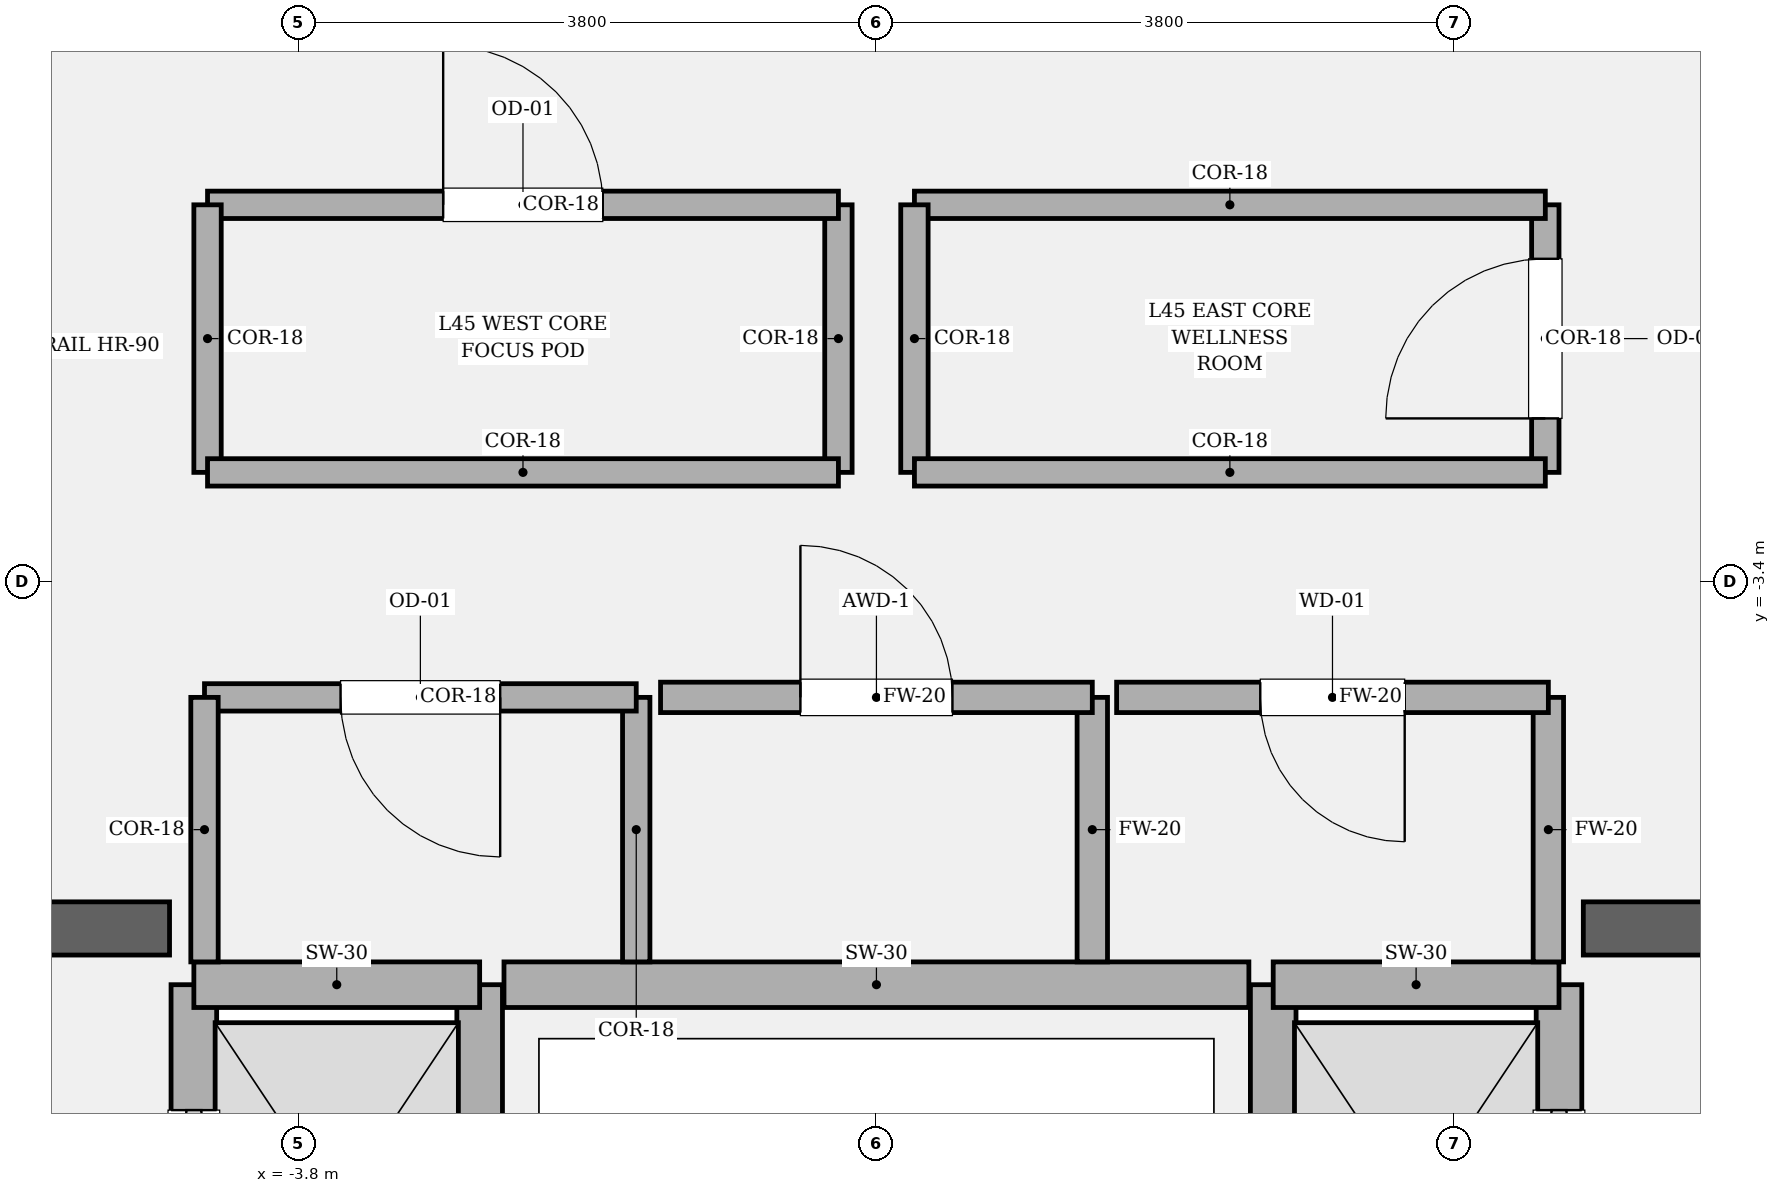
"""IFC4 building model, lengths in metres.
Left out: names, types, materials, properties, quantities, classifications, styles, units other than length and angle.
Written with IfcOpenShell. Run it as: python <this file> out.ifc"""

import sys

from ifc_helpers import new_model, si_unit, direction, frame, frame_2d, origin, place, context, subcontext, project, spatial, rectangle, extrude, element, fill, save


model = new_model("IFC4")
c1 = context("Model", 3, precision=1e-05, world=origin(), true_north=direction((0.0, 1.0)))
c2 = subcontext(c1, "Body", "Model", "MODEL_VIEW")
j1 = project(units=[si_unit("LENGTHUNIT", "METRE"), si_unit("PLANEANGLEUNIT", "RADIAN")], contexts=[c1])
p1 = place(None, origin())
s1 = spatial("IfcSite", under=j1, at=p1, CompositionType="ELEMENT")
p2 = place(p1, origin())
s2 = spatial("IfcBuilding", under=s1, at=p2, CompositionType="ELEMENT")
p3 = place(p2, frame((0.0, 0.0, 192.45)))
s3 = spatial("IfcBuildingStorey", under=s2, at=p3, CompositionType="ELEMENT", Elevation=192.45)
p4 = place(p3, frame((-9.875, -5.68, 0.0), z_axis=(0.0, 0.0, 1.0), x_axis=(1.0, 0.0, 0.0)))
e1 = element("IfcWall", 1, at=p4, inside=s3, PredefinedType="SOLIDWALL", context=c2, shape_type="SweptSolid", body=[
    extrude(rectangle(XDim=5.225, YDim=0.35, at=frame_2d((2.613, 0.0))), origin(), (0.0, 0.0, 1.0), 4.05),
])
p5 = place(p4, frame((1.335, 0.0, 0.0)))
e2 = element("IfcOpeningElement", 2, at=p5, cuts=e1, PredefinedType="OPENING", context=c2, shape_type="SweptSolid", body=[
    extrude(rectangle(XDim=1.18, YDim=2.2, at=frame_2d((0.59, 1.1))), frame((0.0, 0.185, 0.0), z_axis=(0.0, -1.0, 0.0), x_axis=(1.0, 0.0, 0.0)), (0.0, 0.0, 1.0), 0.37),
])
p6 = place(p3, frame((4.65, -5.68, 0.0), z_axis=(0.0, 0.0, 1.0), x_axis=(1.0, 0.0, 0.0)))
e3 = element("IfcWall", 3, at=p6, inside=s3, PredefinedType="SOLIDWALL", context=c2, shape_type="SweptSolid", body=[
    extrude(rectangle(XDim=5.225, YDim=0.35, at=frame_2d((2.613, 0.0))), origin(), (0.0, 0.0, 1.0), 4.05),
])
p7 = place(p6, frame((2.71, 0.0, 0.0)))
e4 = element("IfcOpeningElement", 4, at=p7, cuts=e3, PredefinedType="OPENING", context=c2, shape_type="SweptSolid", body=[
    extrude(rectangle(XDim=1.18, YDim=2.2, at=frame_2d((0.59, 1.1))), frame((0.0, 0.185, 0.0), z_axis=(0.0, -1.0, 0.0), x_axis=(1.0, 0.0, 0.0)), (0.0, 0.0, 1.0), 0.37),
])
p8 = place(p3, frame((-4.49, -8.82, 0.0), z_axis=(0.0, 0.0, 1.0), x_axis=(0.0, 1.0, 0.0)))
e5 = element("IfcWall", 5, at=p8, inside=s3, PredefinedType="SOLIDWALL", context=c2, shape_type="SweptSolid", body=[
    extrude(rectangle(XDim=2.77, YDim=0.3, at=frame_2d((1.385, 0.0))), origin(), (0.0, 0.0, 1.0), 3.83),
])
p9 = place(p8, frame((0.825, 0.0, 0.0)))
e6 = element("IfcOpeningElement", 6, at=p9, cuts=e5, PredefinedType="OPENING", context=c2, shape_type="SweptSolid", body=[
    extrude(rectangle(XDim=1.12, YDim=2.25, at=frame_2d((0.56, 1.125))), frame((0.0, 0.16, 0.0), z_axis=(0.0, -1.0, 0.0), x_axis=(1.0, 0.0, 0.0)), (0.0, 0.0, 1.0), 0.32),
])
p10 = place(p3, frame((-2.61, -8.82, 0.0), z_axis=(0.0, 0.0, 1.0), x_axis=(0.0, 1.0, 0.0)))
e7 = element("IfcWall", 7, at=p10, inside=s3, PredefinedType="SOLIDWALL", context=c2, shape_type="SweptSolid", body=[
    extrude(rectangle(XDim=2.77, YDim=0.3, at=frame_2d((1.385, 0.0))), origin(), (0.0, 0.0, 1.0), 3.83),
])
p11 = place(p3, frame((-4.49, -6.05, 0.0), z_axis=(0.0, 0.0, 1.0), x_axis=(1.0, 0.0, 0.0)))
e8 = element("IfcWall", 8, at=p11, inside=s3, PredefinedType="SOLIDWALL", context=c2, shape_type="SweptSolid", body=[
    extrude(rectangle(XDim=1.88, YDim=0.3, at=frame_2d((0.94, 0.0))), origin(), (0.0, 0.0, 1.0), 3.83),
])
p12 = place(p3, frame((4.49, -8.82, 0.0), z_axis=(0.0, 0.0, 1.0), x_axis=(0.0, 1.0, 0.0)))
e9 = element("IfcWall", 9, at=p12, inside=s3, PredefinedType="SOLIDWALL", context=c2, shape_type="SweptSolid", body=[
    extrude(rectangle(XDim=2.77, YDim=0.3, at=frame_2d((1.385, 0.0))), origin(), (0.0, 0.0, 1.0), 3.83),
])
p13 = place(p12, frame((0.825, 0.0, 0.0)))
e10 = element("IfcOpeningElement", 10, at=p13, cuts=e9, PredefinedType="OPENING", context=c2, shape_type="SweptSolid", body=[
    extrude(rectangle(XDim=1.12, YDim=2.25, at=frame_2d((0.56, 1.125))), frame((0.0, 0.16, 0.0), z_axis=(0.0, -1.0, 0.0), x_axis=(1.0, 0.0, 0.0)), (0.0, 0.0, 1.0), 0.32),
])
p14 = place(p3, frame((2.61, -8.82, 0.0), z_axis=(0.0, 0.0, 1.0), x_axis=(0.0, 1.0, 0.0)))
e11 = element("IfcWall", 11, at=p14, inside=s3, PredefinedType="SOLIDWALL", context=c2, shape_type="SweptSolid", body=[
    extrude(rectangle(XDim=2.77, YDim=0.3, at=frame_2d((1.385, 0.0))), origin(), (0.0, 0.0, 1.0), 3.83),
])
p15 = place(p3, frame((2.61, -6.05, 0.0), z_axis=(0.0, 0.0, 1.0), x_axis=(1.0, 0.0, 0.0)))
e12 = element("IfcWall", 12, at=p15, inside=s3, PredefinedType="SOLIDWALL", context=c2, shape_type="SweptSolid", body=[
    extrude(rectangle(XDim=1.88, YDim=0.3, at=frame_2d((0.94, 0.0))), origin(), (0.0, 0.0, 1.0), 3.83),
])
p16 = place(p3, frame((-2.45, -6.05, 0.0), z_axis=(0.0, 0.0, 1.0), x_axis=(1.0, 0.0, 0.0)))
e13 = element("IfcWall", 13, at=p16, inside=s3, PredefinedType="SOLIDWALL", context=c2, shape_type="SweptSolid", body=[
    extrude(rectangle(XDim=4.9, YDim=0.3, at=frame_2d((2.45, 0.0))), origin(), (0.0, 0.0, 1.0), 3.83),
])
p17 = place(p3, frame((-1.58, -5.9, 0.0), z_axis=(0.0, 0.0, 1.0), x_axis=(0.0, 1.0, 0.0)))
e14 = element("IfcWall", 14, at=p17, inside=s3, PredefinedType="PARTITIONING", context=c2, shape_type="SweptSolid", body=[
    extrude(rectangle(XDim=1.74, YDim=0.18, at=frame_2d((0.87, 0.0))), origin(), (0.0, 0.0, 1.0), 3.83),
])
p18 = place(p3, frame((-1.58, -4.16, 0.0), z_axis=(0.0, 0.0, 1.0), x_axis=(-1.0, 0.0, 0.0)))
e15 = element("IfcWall", 15, at=p18, inside=s3, PredefinedType="PARTITIONING", context=c2, shape_type="SweptSolid", body=[
    extrude(rectangle(XDim=2.84, YDim=0.18, at=frame_2d((1.42, 0.0))), origin(), (0.0, 0.0, 1.0), 3.83),
])
p19 = place(p18, frame((0.895, 0.0, 0.0)))
e16 = element("IfcOpeningElement", 16, at=p19, cuts=e15, PredefinedType="OPENING", context=c2, shape_type="SweptSolid", body=[
    extrude(rectangle(XDim=1.05, YDim=2.2, at=frame_2d((0.525, 1.1))), frame((0.0, 0.1, 0.0), z_axis=(0.0, -1.0, 0.0), x_axis=(1.0, 0.0, 0.0)), (0.0, 0.0, 1.0), 0.2),
])
p20 = place(p3, frame((-4.42, -4.16, 0.0), z_axis=(0.0, 0.0, 1.0), x_axis=(0.0, -1.0, 0.0)))
e17 = element("IfcWall", 17, at=p20, inside=s3, PredefinedType="PARTITIONING", context=c2, shape_type="SweptSolid", body=[
    extrude(rectangle(XDim=1.74, YDim=0.18, at=frame_2d((0.87, 0.0))), origin(), (0.0, 0.0, 1.0), 3.83),
])
p21 = place(p3, frame((1.42, -5.9, 0.0), z_axis=(0.0, 0.0, 1.0), x_axis=(0.0, 1.0, 0.0)))
e18 = element("IfcWall", 18, at=p21, inside=s3, PredefinedType="SOLIDWALL", context=c2, shape_type="SweptSolid", body=[
    extrude(rectangle(XDim=1.74, YDim=0.2, at=frame_2d((0.87, 0.0))), origin(), (0.0, 0.0, 1.0), 3.83),
])
p22 = place(p3, frame((1.42, -4.16, 0.0), z_axis=(0.0, 0.0, 1.0), x_axis=(-1.0, 0.0, 0.0)))
e19 = element("IfcWall", 19, at=p22, inside=s3, PredefinedType="SOLIDWALL", context=c2, shape_type="SweptSolid", body=[
    extrude(rectangle(XDim=2.84, YDim=0.2, at=frame_2d((1.42, 0.0))), origin(), (0.0, 0.0, 1.0), 3.83),
])
p23 = place(p22, frame((0.92, 0.0, 0.0)))
e20 = element("IfcOpeningElement", 20, at=p23, cuts=e19, PredefinedType="OPENING", context=c2, shape_type="SweptSolid", body=[
    extrude(rectangle(XDim=1.0, YDim=2.15, at=frame_2d((0.5, 1.075))), frame((0.0, 0.11, 0.0), z_axis=(0.0, -1.0, 0.0), x_axis=(1.0, 0.0, 0.0)), (0.0, 0.0, 1.0), 0.22),
])
p24 = place(p3, frame((4.42, -5.9, 0.0), z_axis=(0.0, 0.0, 1.0), x_axis=(0.0, 1.0, 0.0)))
e21 = element("IfcWall", 21, at=p24, inside=s3, PredefinedType="SOLIDWALL", context=c2, shape_type="SweptSolid", body=[
    extrude(rectangle(XDim=1.74, YDim=0.2, at=frame_2d((0.87, 0.0))), origin(), (0.0, 0.0, 1.0), 3.83),
])
p25 = place(p3, frame((4.42, -4.16, 0.0), z_axis=(0.0, 0.0, 1.0), x_axis=(-1.0, 0.0, 0.0)))
e22 = element("IfcWall", 22, at=p25, inside=s3, PredefinedType="SOLIDWALL", context=c2, shape_type="SweptSolid", body=[
    extrude(rectangle(XDim=2.84, YDim=0.2, at=frame_2d((1.42, 0.0))), origin(), (0.0, 0.0, 1.0), 3.83),
])
p26 = place(p25, frame((0.945, 0.0, 0.0)))
e23 = element("IfcOpeningElement", 23, at=p26, cuts=e22, PredefinedType="OPENING", context=c2, shape_type="SweptSolid", body=[
    extrude(rectangle(XDim=0.95, YDim=2.15, at=frame_2d((0.475, 1.075))), frame((0.0, 0.11, 0.0), z_axis=(0.0, -1.0, 0.0), x_axis=(1.0, 0.0, 0.0)), (0.0, 0.0, 1.0), 0.22),
])
p27 = place(p3, frame((-0.25, -2.68, 0.0), z_axis=(0.0, 0.0, 1.0), x_axis=(0.0, 1.0, 0.0)))
e24 = element("IfcWall", 24, at=p27, inside=s3, PredefinedType="PARTITIONING", context=c2, shape_type="SweptSolid", body=[
    extrude(rectangle(XDim=1.76, YDim=0.18, at=frame_2d((0.88, 0.0))), origin(), (0.0, 0.0, 1.0), 3.83),
])
p28 = place(p3, frame((-0.25, -0.92, 0.0), z_axis=(0.0, 0.0, 1.0), x_axis=(-1.0, 0.0, 0.0)))
e25 = element("IfcWall", 25, at=p28, inside=s3, PredefinedType="PARTITIONING", context=c2, shape_type="SweptSolid", body=[
    extrude(rectangle(XDim=4.15, YDim=0.18, at=frame_2d((2.075, 0.0))), origin(), (0.0, 0.0, 1.0), 3.83),
])
p29 = place(p28, frame((1.55, 0.0, 0.0)))
e26 = element("IfcOpeningElement", 26, at=p29, cuts=e25, PredefinedType="OPENING", context=c2, shape_type="SweptSolid", body=[
    extrude(rectangle(XDim=1.05, YDim=2.2, at=frame_2d((0.525, 1.1))), frame((0.0, 0.1, 0.0), z_axis=(0.0, -1.0, 0.0), x_axis=(1.0, 0.0, 0.0)), (0.0, 0.0, 1.0), 0.2),
])
p30 = place(p3, frame((-4.4, -0.92, 0.0), z_axis=(0.0, 0.0, 1.0), x_axis=(0.0, -1.0, 0.0)))
e27 = element("IfcWall", 27, at=p30, inside=s3, PredefinedType="PARTITIONING", context=c2, shape_type="SweptSolid", body=[
    extrude(rectangle(XDim=1.76, YDim=0.18, at=frame_2d((0.88, 0.0))), origin(), (0.0, 0.0, 1.0), 3.83),
])
p31 = place(p3, frame((-4.4, -2.68, 0.0), z_axis=(0.0, 0.0, 1.0), x_axis=(1.0, 0.0, 0.0)))
e28 = element("IfcWall", 28, at=p31, inside=s3, PredefinedType="PARTITIONING", context=c2, shape_type="SweptSolid", body=[
    extrude(rectangle(XDim=4.15, YDim=0.18, at=frame_2d((2.075, 0.0))), origin(), (0.0, 0.0, 1.0), 3.83),
])
p32 = place(p3, frame((4.4, -2.68, 0.0), z_axis=(0.0, 0.0, 1.0), x_axis=(0.0, 1.0, 0.0)))
e29 = element("IfcWall", 29, at=p32, inside=s3, PredefinedType="PARTITIONING", context=c2, shape_type="SweptSolid", body=[
    extrude(rectangle(XDim=1.76, YDim=0.18, at=frame_2d((0.88, 0.0))), origin(), (0.0, 0.0, 1.0), 3.83),
])
p33 = place(p32, frame((0.355, 0.0, 0.0)))
e30 = element("IfcOpeningElement", 30, at=p33, cuts=e29, PredefinedType="OPENING", context=c2, shape_type="SweptSolid", body=[
    extrude(rectangle(XDim=1.05, YDim=2.2, at=frame_2d((0.525, 1.1))), frame((0.0, 0.1, 0.0), z_axis=(0.0, -1.0, 0.0), x_axis=(1.0, 0.0, 0.0)), (0.0, 0.0, 1.0), 0.2),
])
p34 = place(p3, frame((4.4, -0.92, 0.0), z_axis=(0.0, 0.0, 1.0), x_axis=(-1.0, 0.0, 0.0)))
e31 = element("IfcWall", 31, at=p34, inside=s3, PredefinedType="PARTITIONING", context=c2, shape_type="SweptSolid", body=[
    extrude(rectangle(XDim=4.15, YDim=0.18, at=frame_2d((2.075, 0.0))), origin(), (0.0, 0.0, 1.0), 3.83),
])
p35 = place(p3, frame((0.25, -0.92, 0.0), z_axis=(0.0, 0.0, 1.0), x_axis=(0.0, -1.0, 0.0)))
e32 = element("IfcWall", 32, at=p35, inside=s3, PredefinedType="PARTITIONING", context=c2, shape_type="SweptSolid", body=[
    extrude(rectangle(XDim=1.76, YDim=0.18, at=frame_2d((0.88, 0.0))), origin(), (0.0, 0.0, 1.0), 3.83),
])
p36 = place(p3, frame((0.25, -2.68, 0.0), z_axis=(0.0, 0.0, 1.0), x_axis=(1.0, 0.0, 0.0)))
e33 = element("IfcWall", 33, at=p36, inside=s3, PredefinedType="PARTITIONING", context=c2, shape_type="SweptSolid", body=[
    extrude(rectangle(XDim=4.15, YDim=0.18, at=frame_2d((2.075, 0.0))), origin(), (0.0, 0.0, 1.0), 3.83),
])
p37 = place(p9, origin())
e34 = element("IfcDoor", 34, at=p37, inside=s3, OperationType="SLIDING_TO_LEFT", PredefinedType="DOOR", context=c2, shape_type="SweptSolid", body=[
    extrude(rectangle(XDim=1.12, YDim=2.25, at=frame_2d((0.56, 1.125))), frame((0.0, 0.025, 0.0), z_axis=(0.0, -1.0, 0.0), x_axis=(1.0, 0.0, 0.0)), (0.0, 0.0, 1.0), 0.05),
])
fill(e6, e34)
p38 = place(p13, origin())
e35 = element("IfcDoor", 35, at=p38, inside=s3, OperationType="SLIDING_TO_RIGHT", PredefinedType="DOOR", context=c2, shape_type="SweptSolid", body=[
    extrude(rectangle(XDim=1.12, YDim=2.25, at=frame_2d((0.56, 1.125))), frame((0.0, 0.025, 0.0), z_axis=(0.0, -1.0, 0.0), x_axis=(1.0, 0.0, 0.0)), (0.0, 0.0, 1.0), 0.05),
])
fill(e10, e35)
p39 = place(p19, origin())
e36 = element("IfcDoor", 36, at=p39, inside=s3, OperationType="SINGLE_SWING_LEFT", PredefinedType="DOOR", context=c2, shape_type="SweptSolid", body=[
    extrude(rectangle(XDim=1.05, YDim=2.2, at=frame_2d((0.525, 1.1))), frame((0.0, 0.025, 0.0), z_axis=(0.0, -1.0, 0.0), x_axis=(1.0, 0.0, 0.0)), (0.0, 0.0, 1.0), 0.05),
])
fill(e16, e36)
p40 = place(p23, origin())
e37 = element("IfcDoor", 37, at=p40, inside=s3, OperationType="SINGLE_SWING_RIGHT", PredefinedType="DOOR", context=c2, shape_type="SweptSolid", body=[
    extrude(rectangle(XDim=1.0, YDim=2.15, at=frame_2d((0.5, 1.075))), frame((0.0, 0.025, 0.0), z_axis=(0.0, -1.0, 0.0), x_axis=(1.0, 0.0, 0.0)), (0.0, 0.0, 1.0), 0.05),
])
fill(e20, e37)
p41 = place(p26, origin())
e38 = element("IfcDoor", 38, at=p41, inside=s3, OperationType="SINGLE_SWING_LEFT", PredefinedType="DOOR", context=c2, shape_type="SweptSolid", body=[
    extrude(rectangle(XDim=0.95, YDim=2.15, at=frame_2d((0.475, 1.075))), frame((0.0, 0.025, 0.0), z_axis=(0.0, -1.0, 0.0), x_axis=(1.0, 0.0, 0.0)), (0.0, 0.0, 1.0), 0.05),
])
fill(e23, e38)
p42 = place(p29, origin())
e39 = element("IfcDoor", 39, at=p42, inside=s3, OperationType="SINGLE_SWING_RIGHT", PredefinedType="DOOR", context=c2, shape_type="SweptSolid", body=[
    extrude(rectangle(XDim=1.05, YDim=2.2, at=frame_2d((0.525, 1.1))), frame((0.0, 0.025, 0.0), z_axis=(0.0, -1.0, 0.0), x_axis=(1.0, 0.0, 0.0)), (0.0, 0.0, 1.0), 0.05),
])
fill(e26, e39)
p43 = place(p33, origin())
e40 = element("IfcDoor", 40, at=p43, inside=s3, OperationType="SINGLE_SWING_LEFT", PredefinedType="DOOR", context=c2, shape_type="SweptSolid", body=[
    extrude(rectangle(XDim=1.05, YDim=2.2, at=frame_2d((0.525, 1.1))), frame((0.0, 0.025, 0.0), z_axis=(0.0, -1.0, 0.0), x_axis=(1.0, 0.0, 0.0)), (0.0, 0.0, 1.0), 0.05),
])
fill(e30, e40)
save(model, sys.argv[1])
